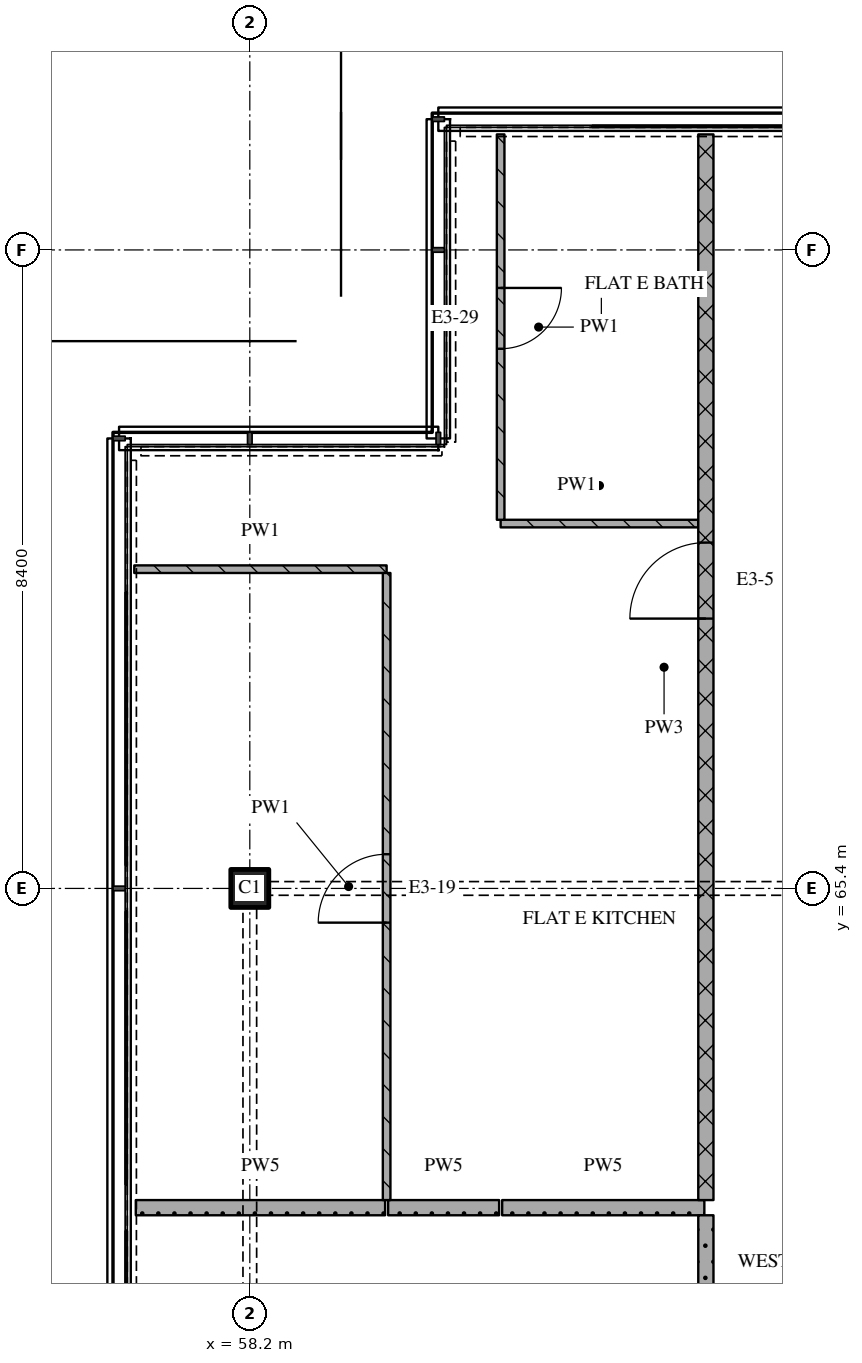
"""IFC4 building model, lengths in metres.
Left out: names, types, materials, properties, quantities, classifications, styles, units other than length and angle.
Written with IfcOpenShell. Run it as: python <this file> out.ifc"""

import sys

from ifc_helpers import new_model, si_unit, direction, frame, frame_2d, origin, origin_2d, place, context, subcontext, project, spatial, rectangle, extrude, element, fill, save


model = new_model("IFC4")
c1 = context("Model", 3, precision=1e-05, world=origin(), true_north=direction((0.0, 1.0)))
c2 = subcontext(c1, "Body", "Model", "MODEL_VIEW")
j1 = project(units=[si_unit("LENGTHUNIT", "METRE"), si_unit("PLANEANGLEUNIT", "RADIAN")], contexts=[c1])
p1 = place(None, origin())
s1 = spatial("IfcSite", under=j1, at=p1, CompositionType="ELEMENT")
p2 = place(p1, origin())
s2 = spatial("IfcBuilding", under=s1, at=p2, CompositionType="ELEMENT")
p3 = place(p2, frame((0.0, 0.0, 277.95)))
s3 = spatial("IfcBuildingStorey", under=s2, at=p3, CompositionType="ELEMENT", Elevation=277.95)
p4 = place(p3, frame((58.2, 65.4, 0.0), z_axis=(0.0, 0.0, 1.0), x_axis=(1.0, 0.0, 0.0)))
e1 = element("IfcColumn", 1, at=p4, inside=s3, PredefinedType="COLUMN", context=c2, shape_type="SweptSolid", body=[
    extrude(rectangle(XDim=0.5, YDim=0.5, at=origin_2d()), origin(), (0.0, 0.0, 1.0), 3.6),
])
p5 = place(p3, frame((56.7, 61.2, 0.0), z_axis=(0.0, 0.0, 1.0), x_axis=(1.0, 0.0, 0.0)))
e2 = element("IfcWall", 2, at=p5, inside=s3, PredefinedType="PARTITIONING", context=c2, shape_type="SweptSolid", body=[
    extrude(rectangle(XDim=3.28, YDim=0.2, at=frame_2d((1.64, 0.0))), origin(), (0.0, 0.0, 1.0), 3.32),
])
p6 = place(p3, frame((60.02, 61.2, 0.0), z_axis=(0.0, 0.0, 1.0), x_axis=(1.0, 0.0, 0.0)))
e3 = element("IfcWall", 3, at=p6, inside=s3, PredefinedType="PARTITIONING", context=c2, shape_type="SweptSolid", body=[
    extrude(rectangle(XDim=1.46, YDim=0.2, at=frame_2d((0.73, 0.0))), origin(), (0.0, 0.0, 1.0), 3.32),
])
p7 = place(p3, frame((61.52, 61.2, 0.0), z_axis=(0.0, 0.0, 1.0), x_axis=(1.0, 0.0, 0.0)))
e4 = element("IfcWall", 4, at=p7, inside=s3, PredefinedType="PARTITIONING", context=c2, shape_type="SweptSolid", body=[
    extrude(rectangle(XDim=2.66, YDim=0.2, at=frame_2d((1.33, 0.0))), origin(), (0.0, 0.0, 1.0), 3.32),
])
p8 = place(p3, frame((56.68, 69.6, 0.0), z_axis=(0.0, 0.0, 1.0), x_axis=(1.0, 0.0, 0.0)))
e5 = element("IfcWall", 5, at=p8, inside=s3, PredefinedType="PARTITIONING", context=c2, shape_type="SweptSolid", body=[
    extrude(rectangle(XDim=3.32, YDim=0.1, at=frame_2d((1.66, 0.0))), origin(), (0.0, 0.0, 1.0), 3.32),
])
p9 = place(p3, frame((61.5, 70.2, 0.0), z_axis=(0.0, 0.0, 1.0), x_axis=(1.0, 0.0, 0.0)))
e6 = element("IfcWall", 6, at=p9, inside=s3, PredefinedType="PARTITIONING", context=c2, shape_type="SweptSolid", body=[
    extrude(rectangle(XDim=2.6, YDim=0.1, at=frame_2d((1.3, 0.0))), origin(), (0.0, 0.0, 1.0), 3.32),
])
p10 = place(p3, frame((60.0, 61.3, 0.0), z_axis=(0.0, 0.0, 1.0), x_axis=(0.0, 1.0, 0.0)))
e7 = element("IfcWall", 7, at=p10, inside=s3, PredefinedType="PARTITIONING", context=c2, shape_type="SweptSolid", body=[
    extrude(rectangle(XDim=8.25, YDim=0.1, at=frame_2d((4.125, 0.0))), origin(), (0.0, 0.0, 1.0), 3.32),
])
p11 = place(p10, frame((3.65, 0.0, 0.0)))
e8 = element("IfcOpeningElement", 8, at=p11, cuts=e7, PredefinedType="OPENING", context=c2, shape_type="SweptSolid", body=[
    extrude(rectangle(XDim=0.9, YDim=2.1, at=frame_2d((0.45, 1.05))), frame((0.0, 0.06, 0.0), z_axis=(0.0, -1.0, 0.0), x_axis=(1.0, 0.0, 0.0)), (0.0, 0.0, 1.0), 0.12),
])
p12 = place(p3, frame((61.5, 75.32, 0.0), z_axis=(0.0, 0.0, 1.0), x_axis=(0.0, -1.0, 0.0)))
e9 = element("IfcWall", 9, at=p12, inside=s3, PredefinedType="PARTITIONING", context=c2, shape_type="SweptSolid", body=[
    extrude(rectangle(XDim=5.07, YDim=0.1, at=frame_2d((2.535, 0.0))), origin(), (0.0, 0.0, 1.0), 3.32),
])
p13 = place(p12, frame((2.02, 0.0, 0.0)))
e10 = element("IfcOpeningElement", 10, at=p13, cuts=e9, PredefinedType="OPENING", context=c2, shape_type="SweptSolid", body=[
    extrude(rectangle(XDim=0.8, YDim=2.1, at=frame_2d((0.4, 1.05))), frame((0.0, 0.06, 0.0), z_axis=(0.0, -1.0, 0.0), x_axis=(1.0, 0.0, 0.0)), (0.0, 0.0, 1.0), 0.12),
])
p14 = place(p3, frame((64.2, 61.3, 0.0), z_axis=(0.0, 0.0, 1.0), x_axis=(0.0, 1.0, 0.0)))
e11 = element("IfcWall", 11, at=p14, inside=s3, PredefinedType="PARTITIONING", context=c2, shape_type="SweptSolid", body=[
    extrude(rectangle(XDim=14.02, YDim=0.2, at=frame_2d((7.01, 0.0))), origin(), (0.0, 0.0, 1.0), 3.32),
])
p15 = place(p14, frame((7.65, 0.0, 0.0)))
e12 = element("IfcOpeningElement", 12, at=p15, cuts=e11, PredefinedType="OPENING", context=c2, shape_type="SweptSolid", body=[
    extrude(rectangle(XDim=1.0, YDim=2.1, at=frame_2d((0.5, 1.05))), frame((0.0, 0.11, 0.0), z_axis=(0.0, -1.0, 0.0), x_axis=(1.0, 0.0, 0.0)), (0.0, 0.0, 1.0), 0.22),
])
p16 = place(p3, frame((64.2, 61.1, 0.0), z_axis=(0.0, 0.0, 1.0), x_axis=(0.0, -1.0, 0.0)))
e13 = element("IfcWall", 13, at=p16, inside=s3, PredefinedType="PARTITIONING", context=c2, shape_type="SweptSolid", body=[
    extrude(rectangle(XDim=2.2, YDim=0.2, at=frame_2d((1.1, 0.0))), origin(), (0.0, 0.0, 1.0), 3.32),
])
p17 = place(p11, origin())
e14 = element("IfcDoor", 14, at=p17, inside=s3, OperationType="SINGLE_SWING_LEFT", PredefinedType="DOOR", context=c2, shape_type="SweptSolid", body=[
    extrude(rectangle(XDim=0.9, YDim=2.1, at=frame_2d((0.45, 1.05))), frame((0.0, 0.025, 0.0), z_axis=(0.0, -1.0, 0.0), x_axis=(1.0, 0.0, 0.0)), (0.0, 0.0, 1.0), 0.05),
])
fill(e8, e14)
p18 = place(p13, origin())
e15 = element("IfcDoor", 15, at=p18, inside=s3, OperationType="SINGLE_SWING_LEFT", PredefinedType="DOOR", context=c2, shape_type="SweptSolid", body=[
    extrude(rectangle(XDim=0.8, YDim=2.1, at=frame_2d((0.4, 1.05))), frame((0.0, 0.025, 0.0), z_axis=(0.0, -1.0, 0.0), x_axis=(1.0, 0.0, 0.0)), (0.0, 0.0, 1.0), 0.05),
])
fill(e10, e15)
p19 = place(p15, origin())
e16 = element("IfcDoor", 16, at=p19, inside=s3, OperationType="SINGLE_SWING_LEFT", PredefinedType="DOOR", context=c2, shape_type="SweptSolid", body=[
    extrude(rectangle(XDim=1.0, YDim=2.1, at=frame_2d((0.5, 1.05))), frame((0.0, 0.025, 0.0), z_axis=(0.0, -1.0, 0.0), x_axis=(1.0, 0.0, 0.0)), (0.0, 0.0, 1.0), 0.05),
])
fill(e12, e16)
save(model, sys.argv[1])
